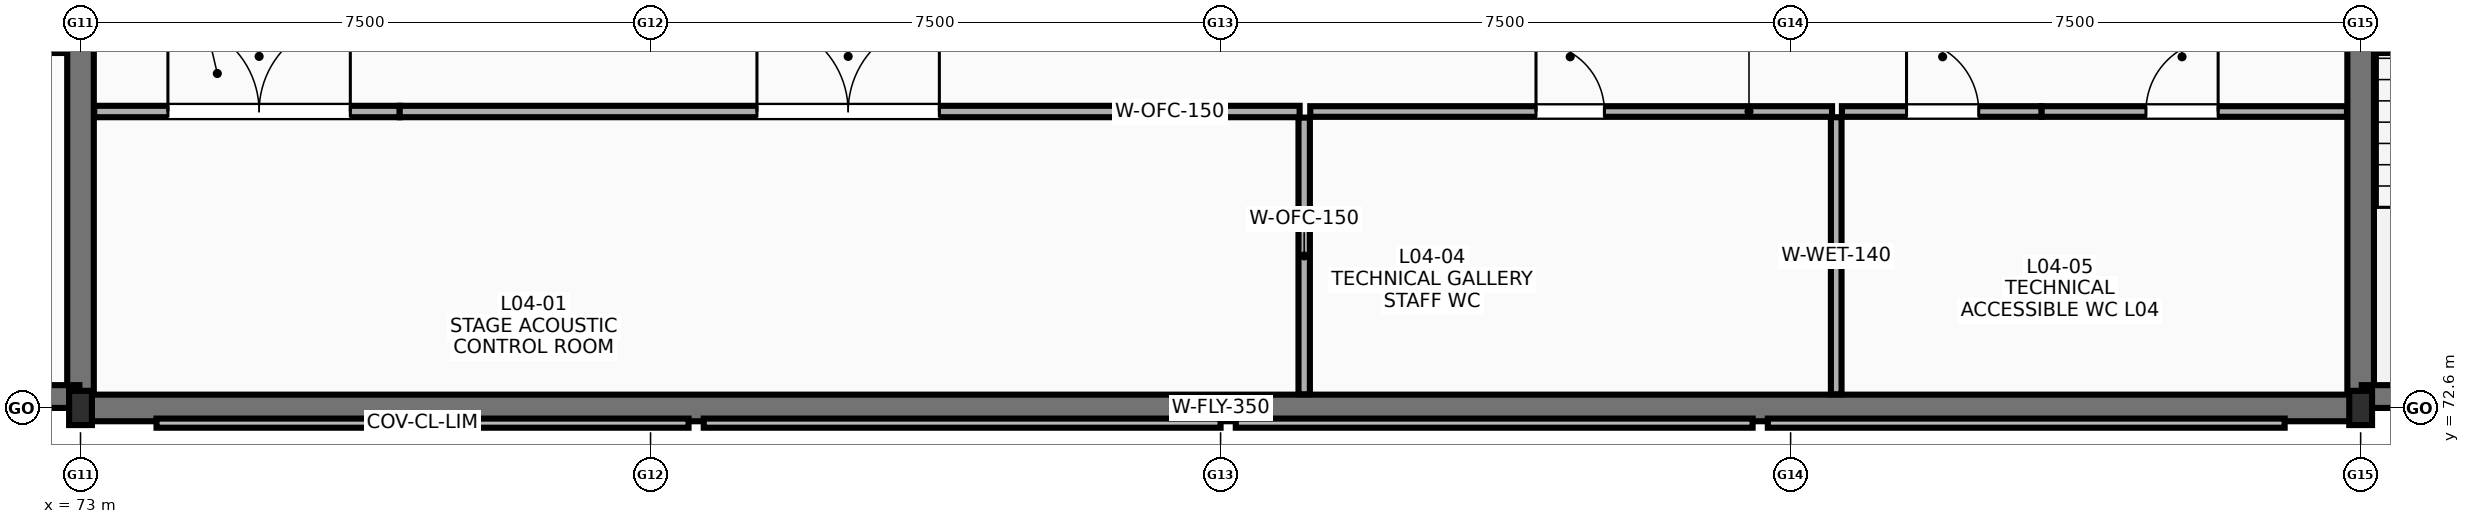
"""IFC4 building model, lengths in metres.
Left out: names, types, materials, properties, quantities, classifications, styles, units other than length and angle.
Written with IfcOpenShell. Run it as: python <this file> out.ifc"""

import sys

from ifc_helpers import new_model, si_unit, direction, frame, frame_2d, origin, origin_2d, place, context, subcontext, project, spatial, rectangle, i_section, extrude, element, fill, save


model = new_model("IFC4")
c1 = context("Model", 3, precision=1e-05, world=origin(), true_north=direction((0.0, 1.0)))
c2 = subcontext(c1, "Body", "Model", "MODEL_VIEW")
j1 = project(units=[si_unit("LENGTHUNIT", "METRE"), si_unit("PLANEANGLEUNIT", "RADIAN")], contexts=[c1])
p1 = place(None, origin())
s1 = spatial("IfcSite", under=j1, at=p1, CompositionType="ELEMENT")
p2 = place(p1, origin())
s2 = spatial("IfcBuilding", under=s1, at=p2, CompositionType="ELEMENT")
p3 = place(p2, frame((0.0, 0.0, 18.0)))
s3 = spatial("IfcBuildingStorey", under=s2, at=p3, CompositionType="ELEMENT", Elevation=18.0)
for number, where, z_axis, x_axis in (
    (1, (73.0, 72.6, 0.0), (0.0, 0.0, 1.0), (1.0, 0.0, 0.0)),
    (2, (103.0, 72.6, 0.0), (0.0, 0.0, 1.0), (1.0, 0.0, 0.0)),
):
    element("IfcColumn", number, at=place(p3, frame(where, z_axis=z_axis, x_axis=x_axis)), inside=s3, PredefinedType="COLUMN", context=c2, shape_type="SweptSolid", body=[
        extrude(i_section(OverallWidth=0.3, OverallDepth=0.45, WebThickness=0.014, FlangeThickness=0.026, FilletRadius=0.027, at=origin_2d()), origin(), (0.0, 0.0, 1.0), 5.4),
    ])
p4 = place(p3, frame((73.0, 72.815, 0.0), z_axis=(0.0, 0.0, 1.0), x_axis=(0.0, 1.0, 0.0)))
e3 = element("IfcWall", 3, at=p4, inside=s3, PredefinedType="SHEAR", context=c2, shape_type="SweptSolid", body=[
    extrude(rectangle(XDim=25.57, YDim=0.35, at=frame_2d((12.785, 0.0))), origin(), (0.0, 0.0, 1.0), 5.4),
])
p5 = place(p4, frame((11.285, 0.0, 0.0), z_axis=(0.0, 0.0, 1.0), x_axis=(-1.0, 0.0, 0.0)))
e4 = element("IfcOpeningElement", 4, at=p5, cuts=e3, PredefinedType="OPENING", context=c2, shape_type="SweptSolid", body=[
    extrude(rectangle(XDim=1.2, YDim=2.15, at=frame_2d((0.6, 1.075))), frame((0.0, 0.185, 0.0), z_axis=(0.0, -1.0, 0.0), x_axis=(1.0, 0.0, 0.0)), (0.0, 0.0, 1.0), 0.37),
])
p6 = place(p3, frame((103.0, 72.815, 0.0), z_axis=(0.0, 0.0, 1.0), x_axis=(0.0, 1.0, 0.0)))
e5 = element("IfcWall", 5, at=p6, inside=s3, PredefinedType="SHEAR", context=c2, shape_type="SweptSolid", body=[
    extrude(rectangle(XDim=25.57, YDim=0.35, at=frame_2d((12.785, 0.0))), origin(), (0.0, 0.0, 1.0), 5.4),
])
p7 = place(p6, frame((10.085, 0.0, 0.0)))
e6 = element("IfcOpeningElement", 6, at=p7, cuts=e5, PredefinedType="OPENING", context=c2, shape_type="SweptSolid", body=[
    extrude(rectangle(XDim=1.2, YDim=2.15, at=frame_2d((0.6, 1.075))), frame((0.0, 0.185, 0.0), z_axis=(0.0, -1.0, 0.0), x_axis=(1.0, 0.0, 0.0)), (0.0, 0.0, 1.0), 0.37),
])
p8 = place(p3, frame((73.005, 72.6, 0.0), z_axis=(0.0, 0.0, 1.0), x_axis=(1.0, 0.0, 0.0)))
e7 = element("IfcWall", 7, at=p8, inside=s3, PredefinedType="SHEAR", context=c2, shape_type="SweptSolid", body=[
    extrude(rectangle(XDim=29.99, YDim=0.35, at=frame_2d((14.995, 0.0))), origin(), (0.0, 0.0, 1.0), 5.4),
])
for number, where, z_axis, x_axis in (
    (8, (69.7, 77.38, 0.0), (0.0, 0.0, 1.0), (1.0, 0.0, 0.0)),
    (9, (103.18, 77.38, 0.0), (0.0, 0.0, 1.0), (1.0, 0.0, 0.0)),
):
    element("IfcWall", number, at=place(p3, frame(where, z_axis=z_axis, x_axis=x_axis)), inside=s3, PredefinedType="SOLIDWALL", context=c2, shape_type="SweptSolid", body=[
        extrude(rectangle(XDim=3.12, YDim=0.22, at=frame_2d((1.56, 0.0))), origin(), (0.0, 0.0, 1.0), 5.4),
    ])
p9 = place(p3, frame((89.1, 72.78, 0.0), z_axis=(0.0, 0.0, 1.0), x_axis=(0.0, 1.0, 0.0)))
e10 = element("IfcWall", 10, at=p9, inside=s3, PredefinedType="PARTITIONING", context=c2, shape_type="SweptSolid", body=[
    extrude(rectangle(XDim=3.64, YDim=0.15, at=frame_2d((1.82, 0.0))), origin(), (0.0, 0.0, 1.0), 5.1),
])
p10 = place(p3, frame((73.18, 76.5, 0.0), z_axis=(0.0, 0.0, 1.0), x_axis=(1.0, 0.0, 0.0)))
e11 = element("IfcWall", 11, at=p10, inside=s3, PredefinedType="PARTITIONING", context=c2, shape_type="SweptSolid", body=[
    extrude(rectangle(XDim=4.02, YDim=0.15, at=frame_2d((2.01, 0.0))), origin(), (0.0, 0.0, 1.0), 5.1),
])
p11 = place(p10, frame((0.97, 0.0, 0.0)))
e12 = element("IfcOpeningElement", 12, at=p11, cuts=e11, PredefinedType="OPENING", context=c2, shape_type="SweptSolid", body=[
    extrude(rectangle(XDim=2.4, YDim=2.6, at=frame_2d((1.2, 1.3))), frame((0.0, 0.085, 0.0), z_axis=(0.0, -1.0, 0.0), x_axis=(1.0, 0.0, 0.0)), (0.0, 0.0, 1.0), 0.17),
])
p12 = place(p3, frame((77.2, 76.5, 0.0), z_axis=(0.0, 0.0, 1.0), x_axis=(1.0, 0.0, 0.0)))
e13 = element("IfcWall", 13, at=p12, inside=s3, PredefinedType="PARTITIONING", context=c2, shape_type="SweptSolid", body=[
    extrude(rectangle(XDim=11.84, YDim=0.15, at=frame_2d((5.92, 0.0))), origin(), (0.0, 0.0, 1.0), 5.1),
])
p13 = place(p12, frame((4.7, 0.0, 0.0)))
e14 = element("IfcOpeningElement", 14, at=p13, cuts=e13, PredefinedType="OPENING", context=c2, shape_type="SweptSolid", body=[
    extrude(rectangle(XDim=2.4, YDim=2.6, at=frame_2d((1.2, 1.3))), frame((0.0, 0.085, 0.0), z_axis=(0.0, -1.0, 0.0), x_axis=(1.0, 0.0, 0.0)), (0.0, 0.0, 1.0), 0.17),
])
p14 = place(p3, frame((96.1, 72.78, 0.0), z_axis=(0.0, 0.0, 1.0), x_axis=(0.0, 1.0, 0.0)))
e15 = element("IfcWall", 15, at=p14, inside=s3, PredefinedType="PARTITIONING", context=c2, shape_type="SweptSolid", body=[
    extrude(rectangle(XDim=3.645, YDim=0.14, at=frame_2d((1.823, 0.0))), origin(), (0.0, 0.0, 1.0), 5.1),
])
p15 = place(p3, frame((89.18, 76.5, 0.0), z_axis=(0.0, 0.0, 1.0), x_axis=(1.0, 0.0, 0.0)))
e16 = element("IfcWall", 16, at=p15, inside=s3, PredefinedType="PARTITIONING", context=c2, shape_type="SweptSolid", body=[
    extrude(rectangle(XDim=6.865, YDim=0.14, at=frame_2d((3.433, 0.0))), origin(), (0.0, 0.0, 1.0), 5.1),
])
p16 = place(p15, frame((2.97, 0.0, 0.0)))
e17 = element("IfcOpeningElement", 17, at=p16, cuts=e16, PredefinedType="OPENING", context=c2, shape_type="SweptSolid", body=[
    extrude(rectangle(XDim=0.9, YDim=2.1, at=frame_2d((0.45, 1.05))), frame((0.0, 0.08, 0.0), z_axis=(0.0, -1.0, 0.0), x_axis=(1.0, 0.0, 0.0)), (0.0, 0.0, 1.0), 0.16),
])
p17 = place(p3, frame((98.8, 76.5, 0.0), z_axis=(0.0, 0.0, 1.0), x_axis=(1.0, 0.0, 0.0)))
e18 = element("IfcWall", 18, at=p17, inside=s3, PredefinedType="PARTITIONING", context=c2, shape_type="SweptSolid", body=[
    extrude(rectangle(XDim=4.02, YDim=0.14, at=frame_2d((2.01, 0.0))), origin(), (0.0, 0.0, 1.0), 5.1),
])
p18 = place(p17, frame((1.375, 0.0, 0.0)))
e19 = element("IfcOpeningElement", 19, at=p18, cuts=e18, PredefinedType="OPENING", context=c2, shape_type="SweptSolid", body=[
    extrude(rectangle(XDim=0.95, YDim=2.1, at=frame_2d((0.475, 1.05))), frame((0.0, 0.08, 0.0), z_axis=(0.0, -1.0, 0.0), x_axis=(1.0, 0.0, 0.0)), (0.0, 0.0, 1.0), 0.16),
])
p19 = place(p3, frame((96.175, 76.5, 0.0), z_axis=(0.0, 0.0, 1.0), x_axis=(1.0, 0.0, 0.0)))
e20 = element("IfcWall", 20, at=p19, inside=s3, PredefinedType="PARTITIONING", context=c2, shape_type="SweptSolid", body=[
    extrude(rectangle(XDim=2.625, YDim=0.14, at=frame_2d((1.312, 0.0))), origin(), (0.0, 0.0, 1.0), 5.1),
])
p20 = place(p19, frame((0.85, 0.0, 0.0)))
e21 = element("IfcOpeningElement", 21, at=p20, cuts=e20, PredefinedType="OPENING", context=c2, shape_type="SweptSolid", body=[
    extrude(rectangle(XDim=0.95, YDim=2.1, at=frame_2d((0.475, 1.05))), frame((0.0, 0.08, 0.0), z_axis=(0.0, -1.0, 0.0), x_axis=(1.0, 0.0, 0.0)), (0.0, 0.0, 1.0), 0.16),
])
for number, where, z_axis, x_axis in (
    (22, (65.5, 72.75, 0.0), (0.0, 0.0, 1.0), (1.0, 0.0, 0.0)),
    (23, (103.015, 72.75, 0.0), (0.0, 0.0, 1.0), (1.0, 0.0, 0.0)),
):
    element("IfcWall", number, at=place(p3, frame(where, z_axis=z_axis, x_axis=x_axis)), inside=s3, PredefinedType="SHEAR", context=c2, shape_type="SweptSolid", body=[
        extrude(rectangle(XDim=7.485, YDim=0.3, at=frame_2d((3.743, 0.0))), origin(), (0.0, 0.0, 1.0), 5.4),
    ])
p21 = place(p11, origin())
e24 = element("IfcDoor", 24, at=p21, inside=s3, OperationType="DOUBLE_DOOR_SINGLE_SWING", PredefinedType="DOOR", context=c2, shape_type="SweptSolid", body=[
    extrude(rectangle(XDim=2.4, YDim=2.6, at=frame_2d((1.2, 1.3))), frame((0.0, 0.025, 0.0), z_axis=(0.0, -1.0, 0.0), x_axis=(1.0, 0.0, 0.0)), (0.0, 0.0, 1.0), 0.05),
])
fill(e12, e24)
p22 = place(p13, origin())
e25 = element("IfcDoor", 25, at=p22, inside=s3, OperationType="DOUBLE_DOOR_SINGLE_SWING", PredefinedType="DOOR", context=c2, shape_type="SweptSolid", body=[
    extrude(rectangle(XDim=2.4, YDim=2.6, at=frame_2d((1.2, 1.3))), frame((0.0, 0.025, 0.0), z_axis=(0.0, -1.0, 0.0), x_axis=(1.0, 0.0, 0.0)), (0.0, 0.0, 1.0), 0.05),
])
fill(e14, e25)
p23 = place(p16, origin())
e26 = element("IfcDoor", 26, at=p23, inside=s3, OperationType="SINGLE_SWING_LEFT", PredefinedType="DOOR", context=c2, shape_type="SweptSolid", body=[
    extrude(rectangle(XDim=0.9, YDim=2.1, at=frame_2d((0.45, 1.05))), frame((0.0, 0.025, 0.0), z_axis=(0.0, -1.0, 0.0), x_axis=(1.0, 0.0, 0.0)), (0.0, 0.0, 1.0), 0.05),
])
fill(e17, e26)
p24 = place(p18, origin())
e27 = element("IfcDoor", 27, at=p24, inside=s3, OperationType="SINGLE_SWING_RIGHT", PredefinedType="DOOR", context=c2, shape_type="SweptSolid", body=[
    extrude(rectangle(XDim=0.95, YDim=2.1, at=frame_2d((0.475, 1.05))), frame((0.0, 0.025, 0.0), z_axis=(0.0, -1.0, 0.0), x_axis=(1.0, 0.0, 0.0)), (0.0, 0.0, 1.0), 0.05),
])
fill(e19, e27)
p25 = place(p20, origin())
e28 = element("IfcDoor", 28, at=p25, inside=s3, OperationType="SINGLE_SWING_LEFT", PredefinedType="DOOR", context=c2, shape_type="SweptSolid", body=[
    extrude(rectangle(XDim=0.95, YDim=2.1, at=frame_2d((0.475, 1.05))), frame((0.0, 0.025, 0.0), z_axis=(0.0, -1.0, 0.0), x_axis=(1.0, 0.0, 0.0)), (0.0, 0.0, 1.0), 0.05),
])
fill(e21, e28)
save(model, sys.argv[1])
